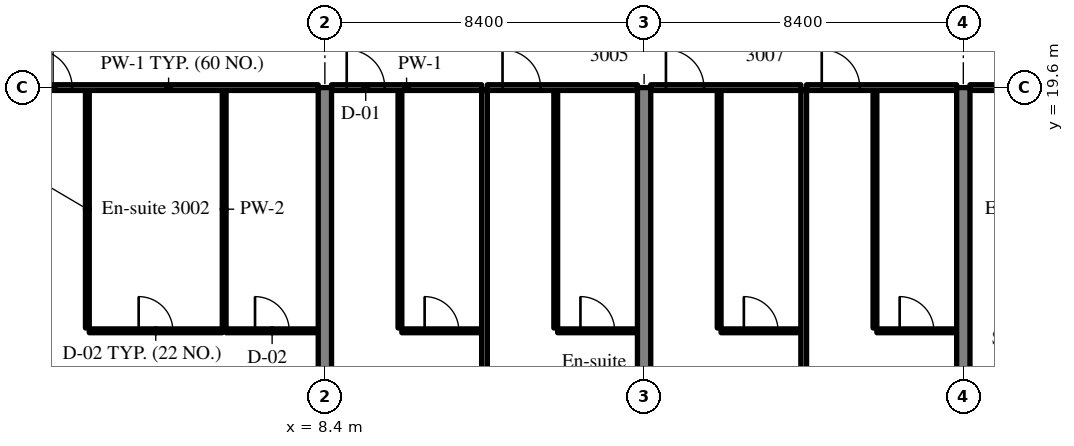
"""IFC4 building model, lengths in metres.
Left out: names, types, materials, properties, quantities, classifications, styles, units other than length and angle.
Written with IfcOpenShell. Run it as: python <this file> out.ifc"""

import sys

from ifc_helpers import new_model, si_unit, direction, frame, frame_2d, origin, place, context, subcontext, project, spatial, rectangle, extrude, source, transform, mapped, element, fill, save


model = new_model("IFC4")
c1 = context("Model", 3, precision=1e-05, world=origin(), true_north=direction((0.0, 1.0)))
c2 = subcontext(c1, "Body", "Model", "MODEL_VIEW")
j1 = project(units=[si_unit("LENGTHUNIT", "METRE"), si_unit("PLANEANGLEUNIT", "RADIAN")], contexts=[c1])
p1 = place(None, origin())
s1 = spatial("IfcSite", under=j1, at=p1, CompositionType="ELEMENT")
p2 = place(p1, origin())
s2 = spatial("IfcBuilding", under=s1, at=p2, CompositionType="ELEMENT")
p3 = place(p2, frame((0.0, 0.0, 125.6)))
s3 = spatial("IfcBuildingStorey", under=s2, at=p3, CompositionType="ELEMENT", Elevation=125.6)
m1 = source(origin(), c2, "Body", "SweptSolid", [
    extrude(rectangle(XDim=14.1, YDim=0.35, at=frame_2d((7.05, 0.0))), origin(), (0.0, 0.0, 1.0), 3.52),
])
for number, where, z_axis, x_axis in (
    (1, (8.4, 5.5, 0.0), (0.0, 0.0, 1.0), (0.0, 1.0, 0.0)),
    (2, (16.8, 5.5, 0.0), (0.0, 0.0, 1.0), (0.0, 1.0, 0.0)),
    (3, (25.2, 5.5, 0.0), (0.0, 0.0, 1.0), (0.0, 1.0, 0.0)),
):
    element("IfcWall", number, at=place(p3, frame(where, z_axis=z_axis, x_axis=x_axis)), inside=s3, PredefinedType="SHEAR", context=c2, shape_type="MappedRepresentation", body=[
        mapped(m1, transform((0.0, 0.0, 0.0), scale=1.0)),
    ])
m2 = source(origin(), c2, "Body", "SweptSolid", [
    extrude(rectangle(XDim=6.25, YDim=0.1, at=frame_2d((3.125, 0.0))), origin(), (0.0, 0.0, 1.0), 3.52),
])
for number, where, z_axis, x_axis in (
    (4, (2.15, 13.275, 0.0), (0.0, 0.0, 1.0), (0.0, 1.0, 0.0)),
    (5, (5.75, 13.275, 0.0), (0.0, 0.0, 1.0), (0.0, 1.0, 0.0)),
):
    element("IfcWall", number, at=place(p3, frame(where, z_axis=z_axis, x_axis=x_axis)), inside=s3, PredefinedType="PARTITIONING", context=c2, shape_type="MappedRepresentation", body=[
        mapped(m2, transform((0.0, 0.0, 0.0), scale=1.0)),
    ])
m3 = source(origin(), c2, "Body", "SweptSolid", [
    extrude(rectangle(XDim=3.5, YDim=0.1, at=frame_2d((1.75, 0.0))), origin(), (0.0, 0.0, 1.0), 3.52),
])
p4 = place(p3, frame((2.2, 13.2, 0.0), z_axis=(0.0, 0.0, 1.0), x_axis=(1.0, 0.0, 0.0)))
e6 = element("IfcWall", 6, at=p4, inside=s3, PredefinedType="PARTITIONING", context=c2, shape_type="MappedRepresentation", body=[
    mapped(m3, transform((0.0, 0.0, 0.0), scale=1.0)),
])
m4 = source(origin(), c2, "Body", "SweptSolid", [
    extrude(rectangle(XDim=0.9, YDim=2.1, at=frame_2d((0.45, 1.05))), frame((0.0, 0.06, 0.0), z_axis=(0.0, -1.0, 0.0), x_axis=(1.0, 0.0, 0.0)), (0.0, 0.0, 1.0), 0.12),
])
p5 = place(p4, frame((1.3, 0.0, 0.0)))
e7 = element("IfcOpeningElement", 7, at=p5, cuts=e6, PredefinedType="OPENING", context=c2, shape_type="MappedRepresentation", body=[
    mapped(m4, transform((0.0, 0.0, 0.0), scale=1.0)),
])
m5 = source(origin(), c2, "Body", "SweptSolid", [
    extrude(rectangle(XDim=2.425, YDim=0.1, at=frame_2d((1.212, 0.0))), origin(), (0.0, 0.0, 1.0), 3.52),
])
p6 = place(p3, frame((5.8, 13.2, 0.0), z_axis=(0.0, 0.0, 1.0), x_axis=(1.0, 0.0, 0.0)))
e8 = element("IfcWall", 8, at=p6, inside=s3, PredefinedType="PARTITIONING", context=c2, shape_type="MappedRepresentation", body=[
    mapped(m5, transform((0.0, 0.0, 0.0), scale=1.0)),
])
p7 = place(p6, frame((0.762, 0.0, 0.0)))
e9 = element("IfcOpeningElement", 9, at=p7, cuts=e8, PredefinedType="OPENING", context=c2, shape_type="MappedRepresentation", body=[
    mapped(m4, transform((0.0, 0.0, 0.0), scale=1.0)),
])
m6 = source(origin(), c2, "Body", "SweptSolid", [
    extrude(rectangle(XDim=7.875, YDim=0.15, at=frame_2d((3.938, 0.0))), origin(), (0.0, 0.0, 1.0), 2.82),
])
p8 = place(p3, frame((0.35, 19.6, 0.0), z_axis=(0.0, 0.0, 1.0), x_axis=(1.0, 0.0, 0.0)))
e10 = element("IfcWall", 10, at=p8, inside=s3, PredefinedType="PARTITIONING", context=c2, shape_type="MappedRepresentation", body=[
    mapped(m6, transform((0.0, 0.0, 0.0), scale=1.0)),
])
m7 = source(origin(), c2, "Body", "SweptSolid", [
    extrude(rectangle(XDim=1.0, YDim=2.1, at=frame_2d((0.5, 1.05))), frame((0.0, 0.085, 0.0), z_axis=(0.0, -1.0, 0.0), x_axis=(1.0, 0.0, 0.0)), (0.0, 0.0, 1.0), 0.17),
])
p9 = place(p8, frame((0.4, 0.0, 0.0)))
e11 = element("IfcOpeningElement", 11, at=p9, cuts=e10, PredefinedType="OPENING", context=c2, shape_type="MappedRepresentation", body=[
    mapped(m7, transform((0.0, 0.0, 0.0), scale=1.0)),
])
p10 = place(p3, frame((10.375, 13.275, 0.0), z_axis=(0.0, 0.0, 1.0), x_axis=(0.0, 1.0, 0.0)))
e12 = element("IfcWall", 12, at=p10, inside=s3, PredefinedType="PARTITIONING", context=c2, shape_type="MappedRepresentation", body=[
    mapped(m2, transform((0.0, 0.0, 0.0), scale=1.0)),
])
m8 = source(origin(), c2, "Body", "SweptSolid", [
    extrude(rectangle(XDim=2.1, YDim=0.1, at=frame_2d((1.05, 0.0))), origin(), (0.0, 0.0, 1.0), 3.52),
])
p11 = place(p3, frame((10.425, 13.2, 0.0), z_axis=(0.0, 0.0, 1.0), x_axis=(1.0, 0.0, 0.0)))
e13 = element("IfcWall", 13, at=p11, inside=s3, PredefinedType="PARTITIONING", context=c2, shape_type="MappedRepresentation", body=[
    mapped(m8, transform((0.0, 0.0, 0.0), scale=1.0)),
])
p12 = place(p11, frame((0.6, 0.0, 0.0)))
e14 = element("IfcOpeningElement", 14, at=p12, cuts=e13, PredefinedType="OPENING", context=c2, shape_type="MappedRepresentation", body=[
    mapped(m4, transform((0.0, 0.0, 0.0), scale=1.0)),
])
m9 = source(origin(), c2, "Body", "SweptSolid", [
    extrude(rectangle(XDim=3.95, YDim=0.15, at=frame_2d((1.975, 0.0))), origin(), (0.0, 0.0, 1.0), 2.82),
])
p13 = place(p3, frame((8.575, 19.6, 0.0), z_axis=(0.0, 0.0, 1.0), x_axis=(1.0, 0.0, 0.0)))
e15 = element("IfcWall", 15, at=p13, inside=s3, PredefinedType="PARTITIONING", context=c2, shape_type="MappedRepresentation", body=[
    mapped(m9, transform((0.0, 0.0, 0.0), scale=1.0)),
])
p14 = place(p13, frame((0.4, 0.0, 0.0)))
e16 = element("IfcOpeningElement", 16, at=p14, cuts=e15, PredefinedType="OPENING", context=c2, shape_type="MappedRepresentation", body=[
    mapped(m7, transform((0.0, 0.0, 0.0), scale=1.0)),
])
p15 = place(p3, frame((14.475, 13.275, 0.0), z_axis=(0.0, 0.0, 1.0), x_axis=(0.0, 1.0, 0.0)))
e17 = element("IfcWall", 17, at=p15, inside=s3, PredefinedType="PARTITIONING", context=c2, shape_type="MappedRepresentation", body=[
    mapped(m2, transform((0.0, 0.0, 0.0), scale=1.0)),
])
m10 = source(origin(), c2, "Body", "SweptSolid", [
    extrude(rectangle(XDim=2.1, YDim=0.1, at=frame_2d((1.05, 0.0))), origin(), (0.0, 0.0, 1.0), 3.52),
])
p16 = place(p3, frame((14.525, 13.2, 0.0), z_axis=(0.0, 0.0, 1.0), x_axis=(1.0, 0.0, 0.0)))
e18 = element("IfcWall", 18, at=p16, inside=s3, PredefinedType="PARTITIONING", context=c2, shape_type="MappedRepresentation", body=[
    mapped(m10, transform((0.0, 0.0, 0.0), scale=1.0)),
])
p17 = place(p16, frame((0.6, 0.0, 0.0)))
e19 = element("IfcOpeningElement", 19, at=p17, cuts=e18, PredefinedType="OPENING", context=c2, shape_type="MappedRepresentation", body=[
    mapped(m4, transform((0.0, 0.0, 0.0), scale=1.0)),
])
p18 = place(p3, frame((12.675, 19.6, 0.0), z_axis=(0.0, 0.0, 1.0), x_axis=(1.0, 0.0, 0.0)))
e20 = element("IfcWall", 20, at=p18, inside=s3, PredefinedType="PARTITIONING", context=c2, shape_type="MappedRepresentation", body=[
    mapped(m9, transform((0.0, 0.0, 0.0), scale=1.0)),
])
p19 = place(p18, frame((0.4, 0.0, 0.0)))
e21 = element("IfcOpeningElement", 21, at=p19, cuts=e20, PredefinedType="OPENING", context=c2, shape_type="MappedRepresentation", body=[
    mapped(m7, transform((0.0, 0.0, 0.0), scale=1.0)),
])
m11 = source(origin(), c2, "Body", "SweptSolid", [
    extrude(rectangle(XDim=13.575, YDim=0.15, at=frame_2d((6.788, 0.0))), origin(), (0.0, 0.0, 1.0), 3.52),
])
p20 = place(p3, frame((12.6, 5.95, 0.0), z_axis=(0.0, 0.0, 1.0), x_axis=(0.0, 1.0, 0.0)))
e22 = element("IfcWall", 22, at=p20, inside=s3, PredefinedType="PARTITIONING", context=c2, shape_type="MappedRepresentation", body=[
    mapped(m11, transform((0.0, 0.0, 0.0), scale=1.0)),
])
p21 = place(p3, frame((18.775, 13.275, 0.0), z_axis=(0.0, 0.0, 1.0), x_axis=(0.0, 1.0, 0.0)))
e23 = element("IfcWall", 23, at=p21, inside=s3, PredefinedType="PARTITIONING", context=c2, shape_type="MappedRepresentation", body=[
    mapped(m2, transform((0.0, 0.0, 0.0), scale=1.0)),
])
p22 = place(p3, frame((18.825, 13.2, 0.0), z_axis=(0.0, 0.0, 1.0), x_axis=(1.0, 0.0, 0.0)))
e24 = element("IfcWall", 24, at=p22, inside=s3, PredefinedType="PARTITIONING", context=c2, shape_type="MappedRepresentation", body=[
    mapped(m10, transform((0.0, 0.0, 0.0), scale=1.0)),
])
p23 = place(p22, frame((0.6, 0.0, 0.0)))
e25 = element("IfcOpeningElement", 25, at=p23, cuts=e24, PredefinedType="OPENING", context=c2, shape_type="MappedRepresentation", body=[
    mapped(m4, transform((0.0, 0.0, 0.0), scale=1.0)),
])
p24 = place(p3, frame((16.975, 19.6, 0.0), z_axis=(0.0, 0.0, 1.0), x_axis=(1.0, 0.0, 0.0)))
e26 = element("IfcWall", 26, at=p24, inside=s3, PredefinedType="PARTITIONING", context=c2, shape_type="MappedRepresentation", body=[
    mapped(m9, transform((0.0, 0.0, 0.0), scale=1.0)),
])
p25 = place(p24, frame((0.4, 0.0, 0.0)))
e27 = element("IfcOpeningElement", 27, at=p25, cuts=e26, PredefinedType="OPENING", context=c2, shape_type="MappedRepresentation", body=[
    mapped(m7, transform((0.0, 0.0, 0.0), scale=1.0)),
])
p26 = place(p3, frame((22.875, 13.275, 0.0), z_axis=(0.0, 0.0, 1.0), x_axis=(0.0, 1.0, 0.0)))
e28 = element("IfcWall", 28, at=p26, inside=s3, PredefinedType="PARTITIONING", context=c2, shape_type="MappedRepresentation", body=[
    mapped(m2, transform((0.0, 0.0, 0.0), scale=1.0)),
])
p27 = place(p3, frame((22.925, 13.2, 0.0), z_axis=(0.0, 0.0, 1.0), x_axis=(1.0, 0.0, 0.0)))
e29 = element("IfcWall", 29, at=p27, inside=s3, PredefinedType="PARTITIONING", context=c2, shape_type="MappedRepresentation", body=[
    mapped(m8, transform((0.0, 0.0, 0.0), scale=1.0)),
])
p28 = place(p27, frame((0.6, 0.0, 0.0)))
e30 = element("IfcOpeningElement", 30, at=p28, cuts=e29, PredefinedType="OPENING", context=c2, shape_type="MappedRepresentation", body=[
    mapped(m4, transform((0.0, 0.0, 0.0), scale=1.0)),
])
p29 = place(p3, frame((21.075, 19.6, 0.0), z_axis=(0.0, 0.0, 1.0), x_axis=(1.0, 0.0, 0.0)))
e31 = element("IfcWall", 31, at=p29, inside=s3, PredefinedType="PARTITIONING", context=c2, shape_type="MappedRepresentation", body=[
    mapped(m9, transform((0.0, 0.0, 0.0), scale=1.0)),
])
p30 = place(p29, frame((0.4, 0.0, 0.0)))
e32 = element("IfcOpeningElement", 32, at=p30, cuts=e31, PredefinedType="OPENING", context=c2, shape_type="MappedRepresentation", body=[
    mapped(m7, transform((0.0, 0.0, 0.0), scale=1.0)),
])
m12 = source(origin(), c2, "Body", "SweptSolid", [
    extrude(rectangle(XDim=12.275, YDim=0.15, at=frame_2d((6.137, 0.0))), origin(), (0.0, 0.0, 1.0), 3.52),
])
p31 = place(p3, frame((21.0, 7.25, 0.0), z_axis=(0.0, 0.0, 1.0), x_axis=(0.0, 1.0, 0.0)))
e33 = element("IfcWall", 33, at=p31, inside=s3, PredefinedType="PARTITIONING", context=c2, shape_type="MappedRepresentation", body=[
    mapped(m12, transform((0.0, 0.0, 0.0), scale=1.0)),
])
p32 = place(p3, frame((25.375, 19.6, 0.0), z_axis=(0.0, 0.0, 1.0), x_axis=(1.0, 0.0, 0.0)))
e34 = element("IfcWall", 34, at=p32, inside=s3, PredefinedType="PARTITIONING", context=c2, shape_type="MappedRepresentation", body=[
    mapped(m9, transform((0.0, 0.0, 0.0), scale=1.0)),
])
p33 = place(p32, frame((1.475, 0.0, 0.0)))
e35 = element("IfcOpeningElement", 35, at=p33, cuts=e34, PredefinedType="OPENING", context=c2, shape_type="MappedRepresentation", body=[
    mapped(m7, transform((0.0, 0.0, 0.0), scale=1.0)),
])
m13 = source(origin(), c2, "Body", "SweptSolid", [
    extrude(rectangle(XDim=0.9, YDim=2.1, at=frame_2d((0.45, 1.05))), frame((0.0, 0.025, 0.0), z_axis=(0.0, -1.0, 0.0), x_axis=(1.0, 0.0, 0.0)), (0.0, 0.0, 1.0), 0.05),
])
p34 = place(p5, origin())
e36 = element("IfcDoor", 36, at=p34, inside=s3, OperationType="SINGLE_SWING_LEFT", PredefinedType="DOOR", context=c2, shape_type="MappedRepresentation", body=[
    mapped(m13, transform((0.0, 0.0, 0.0), scale=1.0)),
])
fill(e7, e36)
p35 = place(p7, origin())
e37 = element("IfcDoor", 37, at=p35, inside=s3, OperationType="SINGLE_SWING_LEFT", PredefinedType="DOOR", context=c2, shape_type="MappedRepresentation", body=[
    mapped(m13, transform((0.0, 0.0, 0.0), scale=1.0)),
])
fill(e9, e37)
m14 = source(origin(), c2, "Body", "SweptSolid", [
    extrude(rectangle(XDim=1.0, YDim=2.1, at=frame_2d((0.5, 1.05))), frame((0.0, 0.025, 0.0), z_axis=(0.0, -1.0, 0.0), x_axis=(1.0, 0.0, 0.0)), (0.0, 0.0, 1.0), 0.05),
])
p36 = place(p9, origin())
e38 = element("IfcDoor", 38, at=p36, inside=s3, OperationType="SINGLE_SWING_LEFT", PredefinedType="DOOR", context=c2, shape_type="MappedRepresentation", body=[
    mapped(m14, transform((0.0, 0.0, 0.0), scale=1.0)),
])
fill(e11, e38)
p37 = place(p12, origin())
e39 = element("IfcDoor", 39, at=p37, inside=s3, OperationType="SINGLE_SWING_LEFT", PredefinedType="DOOR", context=c2, shape_type="MappedRepresentation", body=[
    mapped(m13, transform((0.0, 0.0, 0.0), scale=1.0)),
])
fill(e14, e39)
p38 = place(p14, origin())
e40 = element("IfcDoor", 40, at=p38, inside=s3, OperationType="SINGLE_SWING_LEFT", PredefinedType="DOOR", context=c2, shape_type="MappedRepresentation", body=[
    mapped(m14, transform((0.0, 0.0, 0.0), scale=1.0)),
])
fill(e16, e40)
p39 = place(p17, origin())
e41 = element("IfcDoor", 41, at=p39, inside=s3, OperationType="SINGLE_SWING_LEFT", PredefinedType="DOOR", context=c2, shape_type="MappedRepresentation", body=[
    mapped(m13, transform((0.0, 0.0, 0.0), scale=1.0)),
])
fill(e19, e41)
p40 = place(p19, origin())
e42 = element("IfcDoor", 42, at=p40, inside=s3, OperationType="SINGLE_SWING_LEFT", PredefinedType="DOOR", context=c2, shape_type="MappedRepresentation", body=[
    mapped(m14, transform((0.0, 0.0, 0.0), scale=1.0)),
])
fill(e21, e42)
p41 = place(p23, origin())
e43 = element("IfcDoor", 43, at=p41, inside=s3, OperationType="SINGLE_SWING_LEFT", PredefinedType="DOOR", context=c2, shape_type="MappedRepresentation", body=[
    mapped(m13, transform((0.0, 0.0, 0.0), scale=1.0)),
])
fill(e25, e43)
p42 = place(p25, origin())
e44 = element("IfcDoor", 44, at=p42, inside=s3, OperationType="SINGLE_SWING_LEFT", PredefinedType="DOOR", context=c2, shape_type="MappedRepresentation", body=[
    mapped(m14, transform((0.0, 0.0, 0.0), scale=1.0)),
])
fill(e27, e44)
p43 = place(p28, origin())
e45 = element("IfcDoor", 45, at=p43, inside=s3, OperationType="SINGLE_SWING_LEFT", PredefinedType="DOOR", context=c2, shape_type="MappedRepresentation", body=[
    mapped(m13, transform((0.0, 0.0, 0.0), scale=1.0)),
])
fill(e30, e45)
p44 = place(p30, origin())
e46 = element("IfcDoor", 46, at=p44, inside=s3, OperationType="SINGLE_SWING_LEFT", PredefinedType="DOOR", context=c2, shape_type="MappedRepresentation", body=[
    mapped(m14, transform((0.0, 0.0, 0.0), scale=1.0)),
])
fill(e32, e46)
save(model, sys.argv[1])
